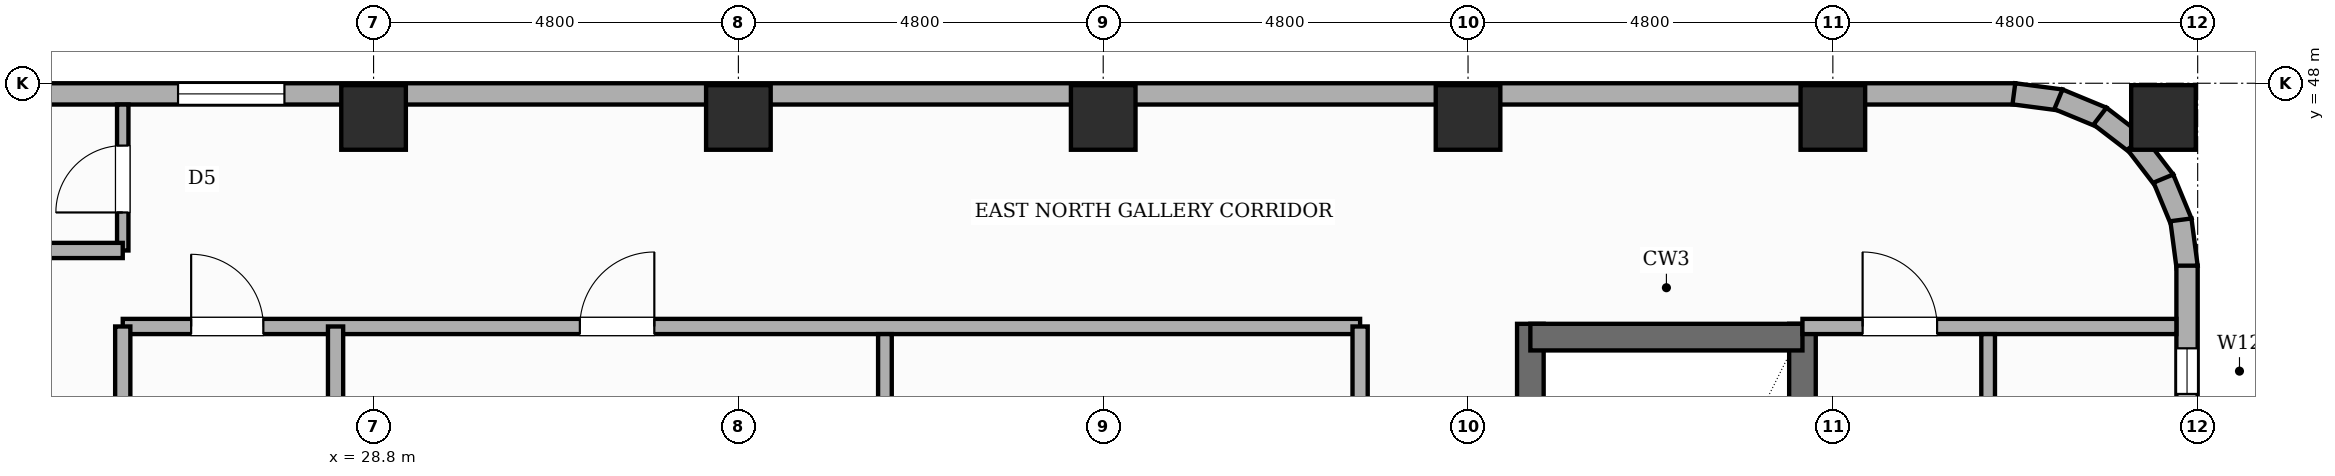
"""IFC4 building model, lengths in metres.
Left out: names, types, materials, properties, quantities, classifications, styles, units other than length and angle.
Written with IfcOpenShell. Run it as: python <this file> out.ifc"""

import sys

from ifc_helpers import new_model, si_unit, direction, frame, frame_2d, origin, origin_2d, place, context, subcontext, project, spatial, rectangle, extrude, element, fill, save


model = new_model("IFC4")
c1 = context("Model", 3, precision=1e-05, world=origin(), true_north=direction((0.0, 1.0)))
c2 = subcontext(c1, "Body", "Model", "MODEL_VIEW")
j1 = project(units=[si_unit("LENGTHUNIT", "METRE"), si_unit("PLANEANGLEUNIT", "RADIAN")], contexts=[c1])
p1 = place(None, origin())
s1 = spatial("IfcSite", under=j1, at=p1, CompositionType="ELEMENT")
p2 = place(p1, origin())
s2 = spatial("IfcBuilding", under=s1, at=p2, CompositionType="ELEMENT")
p3 = place(p2, frame((0.0, 0.0, 236.2)))
s3 = spatial("IfcBuildingStorey", under=s2, at=p3, CompositionType="ELEMENT", Elevation=236.2)
p4 = place(p3, frame((44.02, 35.865, 0.0), z_axis=(0.0, 0.0, 1.0), x_axis=(0.0, 1.0, 0.0)))
e1 = element("IfcWall", 1, at=p4, inside=s3, PredefinedType="SHEAR", context=c2, shape_type="SweptSolid", body=[
    extrude(rectangle(XDim=8.97, YDim=0.35, at=frame_2d((4.485, 0.0))), origin(), (0.0, 0.0, 1.0), 3.6),
])
p5 = place(p4, frame((0.65, 0.0, 0.0)))
e2 = element("IfcOpeningElement", 2, at=p5, cuts=e1, PredefinedType="OPENING", context=c2, shape_type="SweptSolid", body=[
    extrude(rectangle(XDim=0.95, YDim=2.1, at=frame_2d((0.475, 1.05))), frame((0.0, 0.185, 0.0), z_axis=(0.0, -1.0, 0.0), x_axis=(1.0, 0.0, 0.0)), (0.0, 0.0, 1.0), 0.37),
])
p6 = place(p3, frame((47.6, 35.865, 0.0), z_axis=(0.0, 0.0, 1.0), x_axis=(0.0, 1.0, 0.0)))
e3 = element("IfcWall", 3, at=p6, inside=s3, PredefinedType="SHEAR", context=c2, shape_type="SweptSolid", body=[
    extrude(rectangle(XDim=8.97, YDim=0.35, at=frame_2d((4.485, 0.0))), origin(), (0.0, 0.0, 1.0), 3.6),
])
p7 = place(p3, frame((44.02, 44.66, 0.0), z_axis=(0.0, 0.0, 1.0), x_axis=(1.0, 0.0, 0.0)))
e4 = element("IfcWall", 4, at=p7, inside=s3, PredefinedType="SHEAR", context=c2, shape_type="SweptSolid", body=[
    extrude(rectangle(XDim=3.58, YDim=0.35, at=frame_2d((1.79, 0.0))), origin(), (0.0, 0.0, 1.0), 3.6),
])
for number, where, z_axis, x_axis in (
    (5, (28.8, 47.55, 0.0), (0.0, 0.0, 1.0), (1.0, 0.0, 0.0)),
    (6, (33.6, 47.55, 0.0), (0.0, 0.0, 1.0), (1.0, 0.0, 0.0)),
    (7, (38.4, 47.55, 0.0), (0.0, 0.0, 1.0), (1.0, 0.0, 0.0)),
    (8, (43.2, 47.55, 0.0), (0.0, 0.0, 1.0), (1.0, 0.0, 0.0)),
    (9, (48.0, 47.55, 0.0), (0.0, 0.0, 1.0), (1.0, 0.0, 0.0)),
    (10, (52.35, 47.55, 0.0), (0.0, 0.0, 1.0), (1.0, 0.0, 0.0)),
):
    element("IfcColumn", number, at=place(p3, frame(where, z_axis=z_axis, x_axis=x_axis)), inside=s3, PredefinedType="COLUMN", context=c2, shape_type="SweptSolid", body=[
        extrude(rectangle(XDim=0.85, YDim=0.85, at=origin_2d()), origin(), (0.0, 0.0, 1.0), 3.6),
    ])
p8 = place(p3, frame((7.2, 47.86, 0.0), z_axis=(0.0, 0.0, 1.0), x_axis=(1.0, 0.0, 0.0)))
e11 = element("IfcWall", 11, at=p8, inside=s3, PredefinedType="STANDARD", context=c2, shape_type="SweptSolid", body=[
    extrude(rectangle(XDim=43.2, YDim=0.28, at=frame_2d((21.6, 0.0))), origin(), (0.0, 0.0, 1.0), 2.6),
])
p9 = place(p8, frame((19.028, 0.0, 0.65)))
e12 = element("IfcOpeningElement", 12, at=p9, cuts=e11, PredefinedType="OPENING", context=c2, shape_type="SweptSolid", body=[
    extrude(rectangle(XDim=1.4, YDim=1.1, at=frame_2d((0.7, 0.55))), frame((0.0, 0.15, 0.0), z_axis=(0.0, -1.0, 0.0), x_axis=(1.0, 0.0, 0.0)), (0.0, 0.0, 1.0), 0.3),
])
p10 = place(p8, frame((0.308, 0.0, 0.65)))
e13 = element("IfcOpeningElement", 13, at=p10, cuts=e11, PredefinedType="OPENING", context=c2, shape_type="SweptSolid", body=[
    extrude(rectangle(XDim=1.4, YDim=1.1, at=frame_2d((0.7, 0.55))), frame((0.0, 0.15, 0.0), z_axis=(0.0, -1.0, 0.0), x_axis=(1.0, 0.0, 0.0)), (0.0, 0.0, 1.0), 0.3),
])
p11 = place(p8, frame((5.103, 0.0, 0.65)))
e14 = element("IfcOpeningElement", 14, at=p11, cuts=e11, PredefinedType="OPENING", context=c2, shape_type="SweptSolid", body=[
    extrude(rectangle(XDim=1.4, YDim=1.1, at=frame_2d((0.7, 0.55))), frame((0.0, 0.15, 0.0), z_axis=(0.0, -1.0, 0.0), x_axis=(1.0, 0.0, 0.0)), (0.0, 0.0, 1.0), 0.3),
])
p12 = place(p3, frame((50.382, 47.861, 0.0), z_axis=(0.0, 0.0, 1.0), x_axis=(0.991447664465, -0.130504898859, 0.0)))
e15 = element("IfcWall", 15, at=p12, inside=s3, PredefinedType="STANDARD", context=c2, shape_type="SweptSolid", body=[
    extrude(rectangle(XDim=0.627, YDim=0.28, at=frame_2d((0.313, 0.0))), origin(), (0.0, 0.0, 1.0), 2.6),
])
for number, where, z_axis, x_axis in (
    (16, (50.968, 47.789, 0.0), (0.0, 0.0, 1.0), (0.924, -0.382, 0.0)),
    (17, (51.515, 47.567, 0.0), (0.0, 0.0, 1.0), (0.793, -0.609, 0.0)),
    (18, (51.986, 47.212, 0.0), (0.0, 0.0, 1.0), (0.609, -0.793, 0.0)),
    (19, (52.349, 46.746, 0.0), (0.0, 0.0, 1.0), (0.383, -0.924, 0.0)),
    (20, (52.579, 46.203, 0.0), (0.0, 0.0, 1.0), (0.131, -0.991, 0.0)),
):
    element("IfcWall", number, at=place(p3, frame(where, z_axis=z_axis, x_axis=x_axis)), inside=s3, PredefinedType="STANDARD", context=c2, shape_type="SweptSolid", body=[
        extrude(rectangle(XDim=0.626, YDim=0.28, at=frame_2d((0.313, 0.0))), origin(), (0.0, 0.0, 1.0), 2.6),
    ])
p13 = place(p3, frame((52.66, 45.6, 0.0), z_axis=(0.0, 0.0, 1.0), x_axis=(0.0, -1.0, 0.0)))
e21 = element("IfcWall", 21, at=p13, inside=s3, PredefinedType="STANDARD", context=c2, shape_type="SweptSolid", body=[
    extrude(rectangle(XDim=14.4, YDim=0.28, at=frame_2d((7.2, 0.0))), origin(), (0.0, 0.0, 1.0), 2.6),
])
p14 = place(p13, frame((8.8, 0.0, 0.0)))
e22 = element("IfcOpeningElement", 22, at=p14, cuts=e21, PredefinedType="OPENING", context=c2, shape_type="SweptSolid", body=[
    extrude(rectangle(XDim=1.1, YDim=2.15, at=frame_2d((0.55, 1.075))), frame((0.0, 0.15, 0.0), z_axis=(0.0, -1.0, 0.0), x_axis=(1.0, 0.0, 0.0)), (0.0, 0.0, 1.0), 0.3),
])
p15 = place(p13, frame((10.544, 0.0, 0.45)))
e23 = element("IfcOpeningElement", 23, at=p15, cuts=e21, PredefinedType="OPENING", context=c2, shape_type="SweptSolid", body=[
    extrude(rectangle(XDim=0.75, YDim=1.8, at=frame_2d((0.375, 0.9))), frame((0.0, 0.15, 0.0), z_axis=(0.0, -1.0, 0.0), x_axis=(1.0, 0.0, 0.0)), (0.0, 0.0, 1.0), 0.3),
])
p16 = place(p13, frame((1.087, 0.0, 0.45)))
e24 = element("IfcOpeningElement", 24, at=p16, cuts=e21, PredefinedType="OPENING", context=c2, shape_type="SweptSolid", body=[
    extrude(rectangle(XDim=0.6, YDim=1.8, at=frame_2d((0.3, 0.9))), frame((0.0, 0.15, 0.0), z_axis=(0.0, -1.0, 0.0), x_axis=(1.0, 0.0, 0.0)), (0.0, 0.0, 1.0), 0.3),
])
p17 = place(p13, frame((5.511, 0.0, 0.45)))
e25 = element("IfcOpeningElement", 25, at=p17, cuts=e21, PredefinedType="OPENING", context=c2, shape_type="SweptSolid", body=[
    extrude(rectangle(XDim=0.95, YDim=1.8, at=frame_2d((0.475, 0.9))), frame((0.0, 0.15, 0.0), z_axis=(0.0, -1.0, 0.0), x_axis=(1.0, 0.0, 0.0)), (0.0, 0.0, 1.0), 0.3),
])
p18 = place(p3, frame((25.5, 45.8, 0.0), z_axis=(0.0, 0.0, 1.0), x_axis=(0.0, 1.0, 0.0)))
e26 = element("IfcWall", 26, at=p18, inside=s3, PredefinedType="PARTITIONING", context=c2, shape_type="SweptSolid", body=[
    extrude(rectangle(XDim=1.92, YDim=0.15, at=frame_2d((0.96, 0.0))), origin(), (0.0, 0.0, 1.0), 3.32),
])
p19 = place(p18, frame((0.5, 0.0, 0.0)))
e27 = element("IfcOpeningElement", 27, at=p19, cuts=e26, PredefinedType="OPENING", context=c2, shape_type="SweptSolid", body=[
    extrude(rectangle(XDim=0.88, YDim=2.1, at=frame_2d((0.44, 1.05))), frame((0.0, 0.085, 0.0), z_axis=(0.0, -1.0, 0.0), x_axis=(1.0, 0.0, 0.0)), (0.0, 0.0, 1.0), 0.17),
])
p20 = place(p3, frame((22.75, 45.8, 0.0), z_axis=(0.0, 0.0, 1.0), x_axis=(1.0, 0.0, 0.0)))
e28 = element("IfcWall", 28, at=p20, inside=s3, PredefinedType="PARTITIONING", context=c2, shape_type="SweptSolid", body=[
    extrude(rectangle(XDim=2.75, YDim=0.2, at=frame_2d((1.375, 0.0))), origin(), (0.0, 0.0, 1.0), 3.32),
])
p21 = place(p3, frame((25.5, 44.8, 0.0), z_axis=(0.0, 0.0, 1.0), x_axis=(1.0, 0.0, 0.0)))
e29 = element("IfcWall", 29, at=p21, inside=s3, PredefinedType="PARTITIONING", context=c2, shape_type="SweptSolid", body=[
    extrude(rectangle(XDim=16.28, YDim=0.2, at=frame_2d((8.14, 0.0))), origin(), (0.0, 0.0, 1.0), 3.32),
])
p22 = place(p21, frame((0.9, 0.0, 0.0)))
e30 = element("IfcOpeningElement", 30, at=p22, cuts=e29, PredefinedType="OPENING", context=c2, shape_type="SweptSolid", body=[
    extrude(rectangle(XDim=0.95, YDim=2.15, at=frame_2d((0.475, 1.075))), frame((0.0, 0.11, 0.0), z_axis=(0.0, -1.0, 0.0), x_axis=(1.0, 0.0, 0.0)), (0.0, 0.0, 1.0), 0.22),
])
p23 = place(p21, frame((6.014, 0.0, 0.0)))
e31 = element("IfcOpeningElement", 31, at=p23, cuts=e29, PredefinedType="OPENING", context=c2, shape_type="SweptSolid", body=[
    extrude(rectangle(XDim=0.98, YDim=2.18, at=frame_2d((0.49, 1.09))), frame((0.0, 0.11, 0.0), z_axis=(0.0, -1.0, 0.0), x_axis=(1.0, 0.0, 0.0)), (0.0, 0.0, 1.0), 0.22),
])
p24 = place(p3, frame((47.6, 44.8, 0.0), z_axis=(0.0, 0.0, 1.0), x_axis=(1.0, 0.0, 0.0)))
e32 = element("IfcWall", 32, at=p24, inside=s3, PredefinedType="PARTITIONING", context=c2, shape_type="SweptSolid", body=[
    extrude(rectangle(XDim=4.92, YDim=0.2, at=frame_2d((2.46, 0.0))), origin(), (0.0, 0.0, 1.0), 3.32),
])
p25 = place(p24, frame((0.792, 0.0, 0.0)))
e33 = element("IfcOpeningElement", 33, at=p25, cuts=e32, PredefinedType="OPENING", context=c2, shape_type="SweptSolid", body=[
    extrude(rectangle(XDim=0.98, YDim=2.18, at=frame_2d((0.49, 1.09))), frame((0.0, 0.11, 0.0), z_axis=(0.0, -1.0, 0.0), x_axis=(1.0, 0.0, 0.0)), (0.0, 0.0, 1.0), 0.22),
])
p26 = place(p3, frame((25.5, 39.95, 0.0), z_axis=(0.0, 0.0, 1.0), x_axis=(0.0, 1.0, 0.0)))
e34 = element("IfcWall", 34, at=p26, inside=s3, PredefinedType="PARTITIONING", context=c2, shape_type="SweptSolid", body=[
    extrude(rectangle(XDim=4.85, YDim=0.2, at=frame_2d((2.425, 0.0))), origin(), (0.0, 0.0, 1.0), 3.32),
])
p27 = place(p3, frame((41.78, 36.05, 0.0), z_axis=(0.0, 0.0, 1.0), x_axis=(0.0, 1.0, 0.0)))
e35 = element("IfcWall", 35, at=p27, inside=s3, PredefinedType="PARTITIONING", context=c2, shape_type="SweptSolid", body=[
    extrude(rectangle(XDim=8.75, YDim=0.2, at=frame_2d((4.375, 0.0))), origin(), (0.0, 0.0, 1.0), 3.32),
])
p28 = place(p3, frame((28.3, 29.08, 0.0), z_axis=(0.0, 0.0, 1.0), x_axis=(0.0, 1.0, 0.0)))
e36 = element("IfcWall", 36, at=p28, inside=s3, PredefinedType="SOLIDWALL", context=c2, shape_type="SweptSolid", body=[
    extrude(rectangle(XDim=15.72, YDim=0.2, at=frame_2d((7.86, 0.0))), origin(), (0.0, 0.0, 1.0), 3.32),
])
p29 = place(p3, frame((35.528, 29.08, 0.0), z_axis=(0.0, 0.0, 1.0), x_axis=(0.0, 1.0, 0.0)))
e37 = element("IfcWall", 37, at=p29, inside=s3, PredefinedType="PLUMBINGWALL", context=c2, shape_type="SweptSolid", body=[
    extrude(rectangle(XDim=15.62, YDim=0.18, at=frame_2d((7.81, 0.0))), origin(), (0.0, 0.0, 1.0), 3.32),
])
p30 = place(p29, frame((1.505, 0.0, 0.0)))
e38 = element("IfcOpeningElement", 38, at=p30, cuts=e37, PredefinedType="OPENING", context=c2, shape_type="SweptSolid", body=[
    extrude(rectangle(XDim=0.9, YDim=2.15, at=frame_2d((0.45, 1.075))), frame((0.0, 0.1, 0.0), z_axis=(0.0, -1.0, 0.0), x_axis=(1.0, 0.0, 0.0)), (0.0, 0.0, 1.0), 0.2),
])
p31 = place(p29, frame((5.783, 0.0, 0.0)))
e39 = element("IfcOpeningElement", 39, at=p31, cuts=e37, PredefinedType="OPENING", context=c2, shape_type="SweptSolid", body=[
    extrude(rectangle(XDim=0.86, YDim=2.1, at=frame_2d((0.43, 1.05))), frame((0.0, 0.1, 0.0), z_axis=(0.0, -1.0, 0.0), x_axis=(1.0, 0.0, 0.0)), (0.0, 0.0, 1.0), 0.2),
])
p32 = place(p29, frame((9.633, 0.0, 0.0)))
e40 = element("IfcOpeningElement", 40, at=p32, cuts=e37, PredefinedType="OPENING", context=c2, shape_type="SweptSolid", body=[
    extrude(rectangle(XDim=0.86, YDim=2.1, at=frame_2d((0.43, 1.05))), frame((0.0, 0.1, 0.0), z_axis=(0.0, -1.0, 0.0), x_axis=(1.0, 0.0, 0.0)), (0.0, 0.0, 1.0), 0.2),
])
p33 = place(p29, frame((13.327, 0.0, 0.0)))
e41 = element("IfcOpeningElement", 41, at=p33, cuts=e37, PredefinedType="OPENING", context=c2, shape_type="SweptSolid", body=[
    extrude(rectangle(XDim=0.86, YDim=2.1, at=frame_2d((0.43, 1.05))), frame((0.0, 0.1, 0.0), z_axis=(0.0, -1.0, 0.0), x_axis=(1.0, 0.0, 0.0)), (0.0, 0.0, 1.0), 0.2),
])
p34 = place(p3, frame((50.043, 29.08, 0.0), z_axis=(0.0, 0.0, 1.0), x_axis=(0.0, 1.0, 0.0)))
e42 = element("IfcWall", 42, at=p34, inside=s3, PredefinedType="PLUMBINGWALL", context=c2, shape_type="SweptSolid", body=[
    extrude(rectangle(XDim=15.62, YDim=0.18, at=frame_2d((7.81, 0.0))), origin(), (0.0, 0.0, 1.0), 3.32),
])
p35 = place(p34, frame((2.223, 0.0, 0.0)))
e43 = element("IfcOpeningElement", 43, at=p35, cuts=e42, PredefinedType="OPENING", context=c2, shape_type="SweptSolid", body=[
    extrude(rectangle(XDim=0.9, YDim=2.15, at=frame_2d((0.45, 1.075))), frame((0.0, 0.1, 0.0), z_axis=(0.0, -1.0, 0.0), x_axis=(1.0, 0.0, 0.0)), (0.0, 0.0, 1.0), 0.2),
])
p36 = place(p34, frame((7.999, 0.0, 0.0)))
e44 = element("IfcOpeningElement", 44, at=p36, cuts=e42, PredefinedType="OPENING", context=c2, shape_type="SweptSolid", body=[
    extrude(rectangle(XDim=0.9, YDim=2.15, at=frame_2d((0.45, 1.075))), frame((0.0, 0.1, 0.0), z_axis=(0.0, -1.0, 0.0), x_axis=(1.0, 0.0, 0.0)), (0.0, 0.0, 1.0), 0.2),
])
p37 = place(p34, frame((12.75, 0.0, 0.0)))
e45 = element("IfcOpeningElement", 45, at=p37, cuts=e42, PredefinedType="OPENING", context=c2, shape_type="SweptSolid", body=[
    extrude(rectangle(XDim=0.86, YDim=2.1, at=frame_2d((0.43, 1.05))), frame((0.0, 0.1, 0.0), z_axis=(0.0, -1.0, 0.0), x_axis=(1.0, 0.0, 0.0)), (0.0, 0.0, 1.0), 0.2),
])
p38 = place(p9, origin())
e46 = element("IfcWindow", 46, at=p38, inside=s3, PartitioningType="SINGLE_PANEL", PredefinedType="WINDOW", context=c2, shape_type="SweptSolid", body=[
    extrude(rectangle(XDim=1.4, YDim=1.1, at=frame_2d((0.7, 0.55))), frame((0.0, 0.03, 0.0), z_axis=(0.0, -1.0, 0.0), x_axis=(1.0, 0.0, 0.0)), (0.0, 0.0, 1.0), 0.06),
])
fill(e12, e46)
p39 = place(p16, origin())
e47 = element("IfcWindow", 47, at=p39, inside=s3, PartitioningType="SINGLE_PANEL", PredefinedType="WINDOW", context=c2, shape_type="SweptSolid", body=[
    extrude(rectangle(XDim=0.6, YDim=1.8, at=frame_2d((0.3, 0.9))), frame((0.0, 0.03, 0.0), z_axis=(0.0, -1.0, 0.0), x_axis=(1.0, 0.0, 0.0)), (0.0, 0.0, 1.0), 0.06),
])
fill(e24, e47)
p40 = place(p19, origin())
e48 = element("IfcDoor", 48, at=p40, inside=s3, OperationType="SINGLE_SWING_LEFT", PredefinedType="DOOR", context=c2, shape_type="SweptSolid", body=[
    extrude(rectangle(XDim=0.88, YDim=2.1, at=frame_2d((0.44, 1.05))), frame((0.0, 0.025, 0.0), z_axis=(0.0, -1.0, 0.0), x_axis=(1.0, 0.0, 0.0)), (0.0, 0.0, 1.0), 0.05),
])
fill(e27, e48)
p41 = place(p22, origin())
e49 = element("IfcDoor", 49, at=p41, inside=s3, OperationType="SINGLE_SWING_LEFT", PredefinedType="DOOR", context=c2, shape_type="SweptSolid", body=[
    extrude(rectangle(XDim=0.95, YDim=2.15, at=frame_2d((0.475, 1.075))), frame((0.0, 0.025, 0.0), z_axis=(0.0, -1.0, 0.0), x_axis=(1.0, 0.0, 0.0)), (0.0, 0.0, 1.0), 0.05),
])
fill(e30, e49)
p42 = place(p23, origin())
e50 = element("IfcDoor", 50, at=p42, inside=s3, OperationType="SINGLE_SWING_RIGHT", PredefinedType="DOOR", context=c2, shape_type="SweptSolid", body=[
    extrude(rectangle(XDim=0.98, YDim=2.18, at=frame_2d((0.49, 1.09))), frame((0.0, 0.025, 0.0), z_axis=(0.0, -1.0, 0.0), x_axis=(1.0, 0.0, 0.0)), (0.0, 0.0, 1.0), 0.05),
])
fill(e31, e50)
p43 = place(p25, origin())
e51 = element("IfcDoor", 51, at=p43, inside=s3, OperationType="SINGLE_SWING_LEFT", PredefinedType="DOOR", context=c2, shape_type="SweptSolid", body=[
    extrude(rectangle(XDim=0.98, YDim=2.18, at=frame_2d((0.49, 1.09))), frame((0.0, 0.025, 0.0), z_axis=(0.0, -1.0, 0.0), x_axis=(1.0, 0.0, 0.0)), (0.0, 0.0, 1.0), 0.05),
])
fill(e33, e51)
save(model, sys.argv[1])
